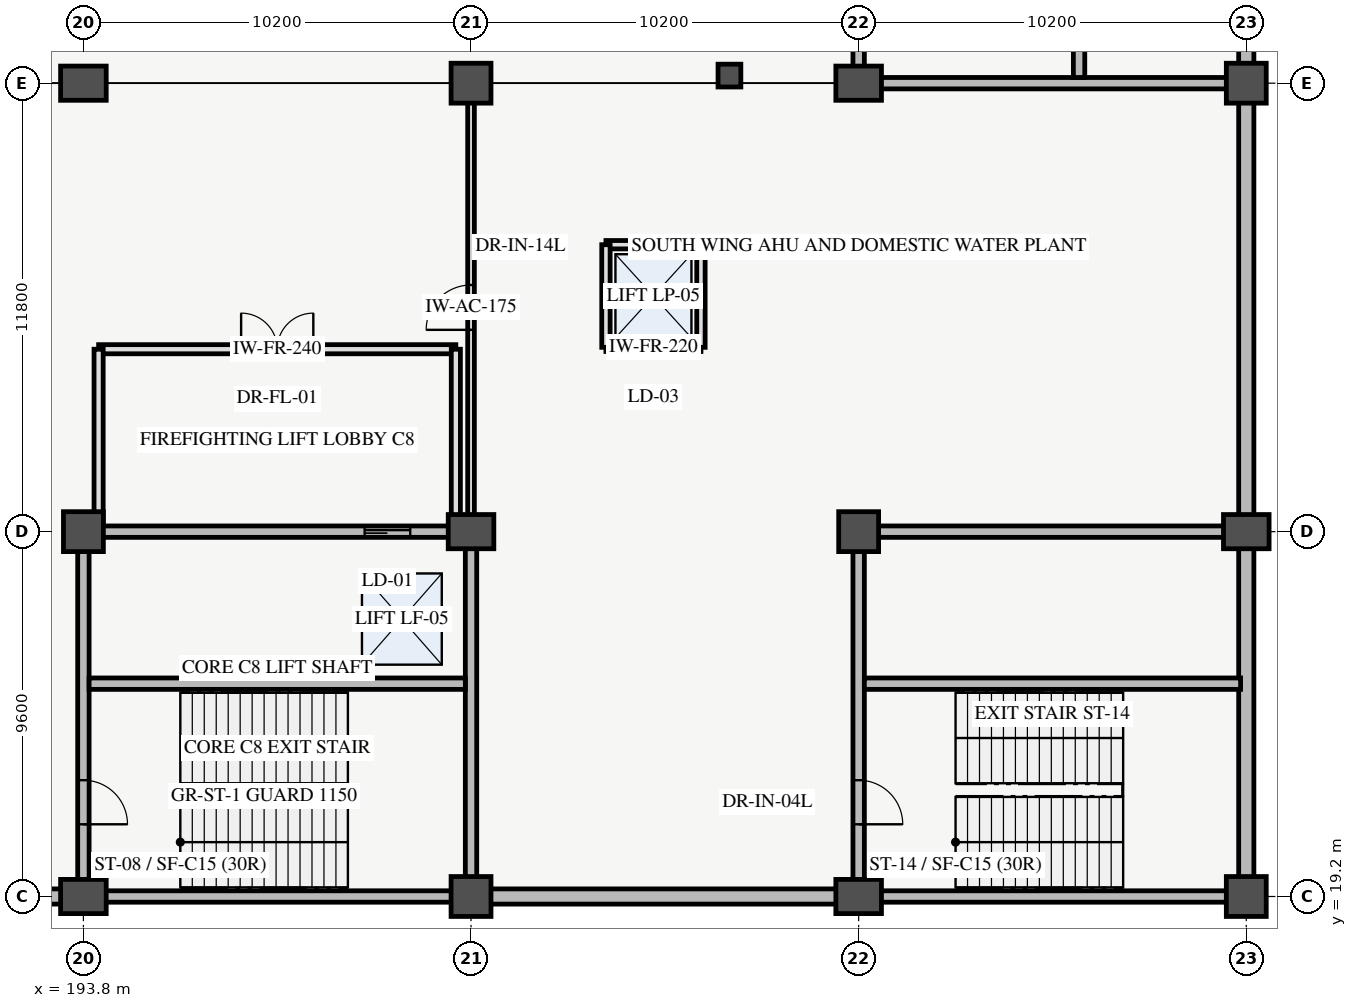
"""IFC4 building model, lengths in metres.
Left out: names, types, materials, properties, quantities, classifications, styles, units other than length and angle.
Written with IfcOpenShell. Run it as: python <this file> out.ifc"""

import sys

from ifc_helpers import new_model, si_unit, direction, frame, frame_2d, origin, origin_2d, place, context, subcontext, project, spatial, rectangle, extrude, element, fill, save


model = new_model("IFC4")
c1 = context("Model", 3, precision=1e-05, world=origin(), true_north=direction((0.0, 1.0)))
c2 = subcontext(c1, "Body", "Model", "MODEL_VIEW")
j1 = project(units=[si_unit("LENGTHUNIT", "METRE"), si_unit("PLANEANGLEUNIT", "RADIAN")], contexts=[c1])
p1 = place(None, origin())
s1 = spatial("IfcSite", under=j1, at=p1, CompositionType="ELEMENT")
p2 = place(p1, origin())
s2 = spatial("IfcBuilding", under=s1, at=p2, CompositionType="ELEMENT")
p3 = place(p2, frame((0.0, 0.0, -4.5)))
s3 = spatial("IfcBuildingStorey", under=s2, at=p3, CompositionType="ELEMENT", Elevation=-4.5)
p4 = place(p3, frame((193.8, 19.2, 0.0), z_axis=(0.0, 0.0, 1.0), x_axis=(1.0, 0.0, 0.0)))
e1 = element("IfcColumn", 1, at=p4, inside=s3, PredefinedType="COLUMN", context=c2, shape_type="SweptSolid", body=[
    extrude(rectangle(XDim=1.2, YDim=0.9, at=origin_2d()), origin(), (0.0, 0.0, 1.0), 4.5),
])
p5 = place(p3, frame((193.8, 28.8, 0.0), z_axis=(0.0, 0.0, 1.0), x_axis=(1.0, 0.0, 0.0)))
e2 = element("IfcColumn", 2, at=p5, inside=s3, PredefinedType="COLUMN", context=c2, shape_type="SweptSolid", body=[
    extrude(rectangle(XDim=1.05, YDim=1.05, at=origin_2d()), origin(), (0.0, 0.0, 1.0), 4.5),
])
p6 = place(p3, frame((193.8, 40.6, 0.0), z_axis=(0.0, 0.0, 1.0), x_axis=(1.0, 0.0, 0.0)))
e3 = element("IfcColumn", 3, at=p6, inside=s3, PredefinedType="COLUMN", context=c2, shape_type="SweptSolid", body=[
    extrude(rectangle(XDim=1.2, YDim=0.9, at=origin_2d()), origin(), (0.0, 0.0, 1.0), 4.5),
])
p7 = place(p3, frame((204.0, 19.2, 0.0), z_axis=(0.0, 0.0, 1.0), x_axis=(1.0, 0.0, 0.0)))
e4 = element("IfcColumn", 4, at=p7, inside=s3, PredefinedType="COLUMN", context=c2, shape_type="SweptSolid", body=[
    extrude(rectangle(XDim=1.05, YDim=1.05, at=origin_2d()), origin(), (0.0, 0.0, 1.0), 4.5),
])
p8 = place(p3, frame((204.0, 28.8, 0.0), z_axis=(0.0, 0.0, 1.0), x_axis=(1.0, 0.0, 0.0)))
e5 = element("IfcColumn", 5, at=p8, inside=s3, PredefinedType="COLUMN", context=c2, shape_type="SweptSolid", body=[
    extrude(rectangle(XDim=1.2, YDim=0.9, at=origin_2d()), origin(), (0.0, 0.0, 1.0), 4.5),
])
p9 = place(p3, frame((204.0, 40.6, 0.0), z_axis=(0.0, 0.0, 1.0), x_axis=(1.0, 0.0, 0.0)))
e6 = element("IfcColumn", 6, at=p9, inside=s3, PredefinedType="COLUMN", context=c2, shape_type="SweptSolid", body=[
    extrude(rectangle(XDim=1.05, YDim=1.05, at=origin_2d()), origin(), (0.0, 0.0, 1.0), 4.5),
])
p10 = place(p3, frame((214.2, 19.2, 0.0), z_axis=(0.0, 0.0, 1.0), x_axis=(1.0, 0.0, 0.0)))
e7 = element("IfcColumn", 7, at=p10, inside=s3, PredefinedType="COLUMN", context=c2, shape_type="SweptSolid", body=[
    extrude(rectangle(XDim=1.2, YDim=0.9, at=origin_2d()), origin(), (0.0, 0.0, 1.0), 4.5),
])
p11 = place(p3, frame((214.2, 28.8, 0.0), z_axis=(0.0, 0.0, 1.0), x_axis=(1.0, 0.0, 0.0)))
e8 = element("IfcColumn", 8, at=p11, inside=s3, PredefinedType="COLUMN", context=c2, shape_type="SweptSolid", body=[
    extrude(rectangle(XDim=1.05, YDim=1.05, at=origin_2d()), origin(), (0.0, 0.0, 1.0), 4.5),
])
p12 = place(p3, frame((214.2, 40.6, 0.0), z_axis=(0.0, 0.0, 1.0), x_axis=(1.0, 0.0, 0.0)))
e9 = element("IfcColumn", 9, at=p12, inside=s3, PredefinedType="COLUMN", context=c2, shape_type="SweptSolid", body=[
    extrude(rectangle(XDim=1.2, YDim=0.9, at=origin_2d()), origin(), (0.0, 0.0, 1.0), 4.5),
])
p13 = place(p3, frame((224.4, 19.2, 0.0), z_axis=(0.0, 0.0, 1.0), x_axis=(1.0, 0.0, 0.0)))
e10 = element("IfcColumn", 10, at=p13, inside=s3, PredefinedType="COLUMN", context=c2, shape_type="SweptSolid", body=[
    extrude(rectangle(XDim=1.05, YDim=1.05, at=origin_2d()), origin(), (0.0, 0.0, 1.0), 4.5),
])
p14 = place(p3, frame((224.4, 28.8, 0.0), z_axis=(0.0, 0.0, 1.0), x_axis=(1.0, 0.0, 0.0)))
e11 = element("IfcColumn", 11, at=p14, inside=s3, PredefinedType="COLUMN", context=c2, shape_type="SweptSolid", body=[
    extrude(rectangle(XDim=1.2, YDim=0.9, at=origin_2d()), origin(), (0.0, 0.0, 1.0), 4.5),
])
p15 = place(p3, frame((224.4, 40.6, 0.0), z_axis=(0.0, 0.0, 1.0), x_axis=(1.0, 0.0, 0.0)))
e12 = element("IfcColumn", 12, at=p15, inside=s3, PredefinedType="COLUMN", context=c2, shape_type="SweptSolid", body=[
    extrude(rectangle(XDim=1.05, YDim=1.05, at=origin_2d()), origin(), (0.0, 0.0, 1.0), 4.5),
])
p16 = place(p3, frame((193.8, 19.2, 0.0), z_axis=(0.0, 0.0, 1.0), x_axis=(1.0, 0.0, 0.0)))
e13 = element("IfcWall", 13, at=p16, inside=s3, PredefinedType="SHEAR", context=c2, shape_type="SweptSolid", body=[
    extrude(rectangle(XDim=10.2, YDim=0.3, at=frame_2d((5.1, 0.0))), origin(), (0.0, 0.0, 1.0), 4.5),
])
p17 = place(p3, frame((193.8, 28.8, 0.0), z_axis=(0.0, 0.0, 1.0), x_axis=(1.0, 0.0, 0.0)))
e14 = element("IfcWall", 14, at=p17, inside=s3, PredefinedType="SHEAR", context=c2, shape_type="SweptSolid", body=[
    extrude(rectangle(XDim=10.2, YDim=0.3, at=frame_2d((5.1, 0.0))), origin(), (0.0, 0.0, 1.0), 4.5),
])
p18 = place(p17, frame((7.4, 0.0, 0.0)))
e15 = element("IfcOpeningElement", 15, at=p18, cuts=e14, PredefinedType="OPENING", context=c2, shape_type="SweptSolid", body=[
    extrude(rectangle(XDim=1.2, YDim=2.25, at=frame_2d((0.6, 1.125))), frame((0.0, 0.16, 0.0), z_axis=(0.0, -1.0, 0.0), x_axis=(1.0, 0.0, 0.0)), (0.0, 0.0, 1.0), 0.32),
])
p19 = place(p3, frame((193.8, 19.2, 0.0), z_axis=(0.0, 0.0, 1.0), x_axis=(0.0, 1.0, 0.0)))
e16 = element("IfcWall", 16, at=p19, inside=s3, PredefinedType="SHEAR", context=c2, shape_type="SweptSolid", body=[
    extrude(rectangle(XDim=9.6, YDim=0.3, at=frame_2d((4.8, 0.0))), origin(), (0.0, 0.0, 1.0), 4.5),
])
p20 = place(p19, frame((1.9, 0.0, 0.0)))
e17 = element("IfcOpeningElement", 17, at=p20, cuts=e16, PredefinedType="OPENING", context=c2, shape_type="SweptSolid", body=[
    extrude(rectangle(XDim=1.16, YDim=2.2, at=frame_2d((0.58, 1.1))), frame((0.0, 0.16, 0.0), z_axis=(0.0, -1.0, 0.0), x_axis=(1.0, 0.0, 0.0)), (0.0, 0.0, 1.0), 0.32),
])
p21 = place(p3, frame((204.0, 19.2, 0.0), z_axis=(0.0, 0.0, 1.0), x_axis=(0.0, 1.0, 0.0)))
e18 = element("IfcWall", 18, at=p21, inside=s3, PredefinedType="SHEAR", context=c2, shape_type="SweptSolid", body=[
    extrude(rectangle(XDim=9.6, YDim=0.3, at=frame_2d((4.8, 0.0))), origin(), (0.0, 0.0, 1.0), 4.5),
])
p22 = place(p3, frame((173.4, 19.2, 0.0), z_axis=(0.0, 0.0, 1.0), x_axis=(1.0, 0.0, 0.0)))
e19 = element("IfcWall", 19, at=p22, inside=s3, PredefinedType="SOLIDWALL", context=c2, shape_type="SweptSolid", body=[
    extrude(rectangle(XDim=20.2, YDim=0.4, at=frame_2d((10.1, 0.0))), origin(), (0.0, 0.0, 1.0), 4.1),
])
p23 = place(p3, frame((204.2, 19.2, 0.0), z_axis=(0.0, 0.0, 1.0), x_axis=(1.0, 0.0, 0.0)))
e20 = element("IfcWall", 20, at=p23, inside=s3, PredefinedType="SOLIDWALL", context=c2, shape_type="SweptSolid", body=[
    extrude(rectangle(XDim=9.8, YDim=0.4, at=frame_2d((4.9, 0.0))), origin(), (0.0, 0.0, 1.0), 4.1),
])
p24 = place(p3, frame((224.4, 19.2, 0.0), z_axis=(0.0, 0.0, 1.0), x_axis=(0.0, 1.0, 0.0)))
e21 = element("IfcWall", 21, at=p24, inside=s3, PredefinedType="SOLIDWALL", context=c2, shape_type="SweptSolid", body=[
    extrude(rectangle(XDim=68.6, YDim=0.4, at=frame_2d((34.3, 0.0))), origin(), (0.0, 0.0, 1.0), 4.1),
])
p25 = place(p3, frame((210.8, 40.8, 0.0), z_axis=(0.0, 0.0, 1.0), x_axis=(1.0, 0.0, 0.0)))
e22 = element("IfcColumn", 22, at=p25, inside=s3, PredefinedType="COLUMN", context=c2, shape_type="SweptSolid", body=[
    extrude(rectangle(XDim=0.6, YDim=0.6, at=origin_2d()), origin(), (0.0, 0.0, 1.0), 4.1),
])
p26 = place(p3, frame((193.95, 24.8, 0.0), z_axis=(0.0, 0.0, 1.0), x_axis=(1.0, 0.0, 0.0)))
e23 = element("IfcWall", 23, at=p26, inside=s3, PredefinedType="SHEAR", context=c2, shape_type="SweptSolid", body=[
    extrude(rectangle(XDim=9.9, YDim=0.3, at=frame_2d((4.95, 0.0))), origin(), (0.0, 0.0, 1.0), 4.5),
])
for number, where, z_axis, x_axis in (
    (24, (214.2, 19.2, 0.0), (0.0, 0.0, 1.0), (1.0, 0.0, 0.0)),
    (25, (214.2, 28.8, 0.0), (0.0, 0.0, 1.0), (1.0, 0.0, 0.0)),
):
    element("IfcWall", number, at=place(p3, frame(where, z_axis=z_axis, x_axis=x_axis)), inside=s3, PredefinedType="SHEAR", context=c2, shape_type="SweptSolid", body=[
        extrude(rectangle(XDim=10.2, YDim=0.3, at=frame_2d((5.1, 0.0))), origin(), (0.0, 0.0, 1.0), 4.5),
    ])
p27 = place(p3, frame((214.2, 19.2, 0.0), z_axis=(0.0, 0.0, 1.0), x_axis=(0.0, 1.0, 0.0)))
e26 = element("IfcWall", 26, at=p27, inside=s3, PredefinedType="SHEAR", context=c2, shape_type="SweptSolid", body=[
    extrude(rectangle(XDim=9.6, YDim=0.3, at=frame_2d((4.8, 0.0))), origin(), (0.0, 0.0, 1.0), 4.5),
])
p28 = place(p27, frame((1.9, 0.0, 0.0)))
e27 = element("IfcOpeningElement", 27, at=p28, cuts=e26, PredefinedType="OPENING", context=c2, shape_type="SweptSolid", body=[
    extrude(rectangle(XDim=1.16, YDim=2.2, at=frame_2d((0.58, 1.1))), frame((0.0, 0.16, 0.0), z_axis=(0.0, -1.0, 0.0), x_axis=(1.0, 0.0, 0.0)), (0.0, 0.0, 1.0), 0.32),
])
p29 = place(p3, frame((214.35, 24.8, 0.0), z_axis=(0.0, 0.0, 1.0), x_axis=(1.0, 0.0, 0.0)))
e28 = element("IfcWall", 28, at=p29, inside=s3, PredefinedType="SHEAR", context=c2, shape_type="SweptSolid", body=[
    extrude(rectangle(XDim=9.9, YDim=0.3, at=frame_2d((4.95, 0.0))), origin(), (0.0, 0.0, 1.0), 4.5),
])
p30 = place(p3, frame((214.2, 40.6, 0.0), z_axis=(0.0, 0.0, 1.0), x_axis=(1.0, 0.0, 0.0)))
e29 = element("IfcWall", 29, at=p30, inside=s3, PredefinedType="SHEAR", context=c2, shape_type="SweptSolid", body=[
    extrude(rectangle(XDim=10.2, YDim=0.3, at=frame_2d((5.1, 0.0))), origin(), (0.0, 0.0, 1.0), 4.5),
])
p31 = place(p3, frame((214.2, 40.6, 0.0), z_axis=(0.0, 0.0, 1.0), x_axis=(0.0, 1.0, 0.0)))
e30 = element("IfcWall", 30, at=p31, inside=s3, PredefinedType="SHEAR", context=c2, shape_type="SweptSolid", body=[
    extrude(rectangle(XDim=11.8, YDim=0.3, at=frame_2d((5.9, 0.0))), origin(), (0.0, 0.0, 1.0), 4.5),
])
p32 = place(p3, frame((220.0, 40.75, 0.0), z_axis=(0.0, 0.0, 1.0), x_axis=(0.0, 1.0, 0.0)))
e31 = element("IfcWall", 31, at=p32, inside=s3, PredefinedType="SHEAR", context=c2, shape_type="SweptSolid", body=[
    extrude(rectangle(XDim=11.5, YDim=0.3, at=frame_2d((5.75, 0.0))), origin(), (0.0, 0.0, 1.0), 4.5),
])
p33 = place(p3, frame((207.55, 33.65, 0.0), z_axis=(0.0, 0.0, 1.0), x_axis=(1.0, 0.0, 0.0)))
e32 = element("IfcWall", 32, at=p33, inside=s3, PredefinedType="PARTITIONING", context=c2, shape_type="SweptSolid", body=[
    extrude(rectangle(XDim=2.5, YDim=0.22, at=frame_2d((1.25, 0.0))), origin(), (0.0, 0.0, 1.0), 4.1),
])
p34 = place(p33, frame((0.575, 0.0, 0.0)))
e33 = element("IfcOpeningElement", 33, at=p34, cuts=e32, PredefinedType="OPENING", context=c2, shape_type="SweptSolid", body=[
    extrude(rectangle(XDim=1.35, YDim=2.3, at=frame_2d((0.675, 1.15))), frame((0.0, 0.12, 0.0), z_axis=(0.0, -1.0, 0.0), x_axis=(1.0, 0.0, 0.0)), (0.0, 0.0, 1.0), 0.24),
])
p35 = place(p3, frame((207.55, 36.35, 0.0), z_axis=(0.0, 0.0, 1.0), x_axis=(1.0, 0.0, 0.0)))
e34 = element("IfcWall", 34, at=p35, inside=s3, PredefinedType="PARTITIONING", context=c2, shape_type="SweptSolid", body=[
    extrude(rectangle(XDim=2.5, YDim=0.22, at=frame_2d((1.25, 0.0))), origin(), (0.0, 0.0, 1.0), 4.1),
])
for number, where, z_axis, x_axis in (
    (35, (207.55, 33.65, 0.0), (0.0, 0.0, 1.0), (0.0, 1.0, 0.0)),
    (36, (210.05, 33.65, 0.0), (0.0, 0.0, 1.0), (0.0, 1.0, 0.0)),
):
    element("IfcWall", number, at=place(p3, frame(where, z_axis=z_axis, x_axis=x_axis)), inside=s3, PredefinedType="PARTITIONING", context=c2, shape_type="SweptSolid", body=[
        extrude(rectangle(XDim=2.7, YDim=0.22, at=frame_2d((1.35, 0.0))), origin(), (0.0, 0.0, 1.0), 4.1),
    ])
p36 = place(p3, frame((194.2, 33.6, 0.0), z_axis=(0.0, 0.0, 1.0), x_axis=(1.0, 0.0, 0.0)))
e37 = element("IfcWall", 37, at=p36, inside=s3, PredefinedType="PARTITIONING", context=c2, shape_type="SweptSolid", body=[
    extrude(rectangle(XDim=9.4, YDim=0.24, at=frame_2d((4.7, 0.0))), origin(), (0.0, 0.0, 1.0), 2.75),
])
p37 = place(p36, frame((3.75, 0.0, 0.0)))
e38 = element("IfcOpeningElement", 38, at=p37, cuts=e37, PredefinedType="OPENING", context=c2, shape_type="SweptSolid", body=[
    extrude(rectangle(XDim=1.9, YDim=2.25, at=frame_2d((0.95, 1.125))), frame((0.0, 0.13, 0.0), z_axis=(0.0, -1.0, 0.0), x_axis=(1.0, 0.0, 0.0)), (0.0, 0.0, 1.0), 0.26),
])
for number, where, z_axis, x_axis in (
    (39, (203.6, 29.0, 0.0), (0.0, 0.0, 1.0), (0.0, 1.0, 0.0)),
    (40, (194.2, 29.0, 0.0), (0.0, 0.0, 1.0), (0.0, 1.0, 0.0)),
):
    element("IfcWall", number, at=place(p3, frame(where, z_axis=z_axis, x_axis=x_axis)), inside=s3, PredefinedType="PARTITIONING", context=c2, shape_type="SweptSolid", body=[
        extrude(rectangle(XDim=4.6, YDim=0.24, at=frame_2d((2.3, 0.0))), origin(), (0.0, 0.0, 1.0), 2.75),
    ])
p38 = place(p3, frame((204.0, 29.2, 0.0), z_axis=(0.0, 0.0, 1.0), x_axis=(0.0, 1.0, 0.0)))
e41 = element("IfcWall", 41, at=p38, inside=s3, PredefinedType="PARTITIONING", context=c2, shape_type="SweptSolid", body=[
    extrude(rectangle(XDim=11.0, YDim=0.175, at=frame_2d((5.5, 0.0))), origin(), (0.0, 0.0, 1.0), 2.75),
])
p39 = place(p38, frame((4.91, 0.0, 0.0)))
e42 = element("IfcOpeningElement", 42, at=p39, cuts=e41, PredefinedType="OPENING", context=c2, shape_type="SweptSolid", body=[
    extrude(rectangle(XDim=1.18, YDim=2.22, at=frame_2d((0.59, 1.11))), frame((0.0, 0.097, 0.0), z_axis=(0.0, -1.0, 0.0), x_axis=(1.0, 0.0, 0.0)), (0.0, 0.0, 1.0), 0.195),
])
p40 = place(p20, origin())
e43 = element("IfcDoor", 43, at=p40, inside=s3, OperationType="SINGLE_SWING_LEFT", PredefinedType="DOOR", context=c2, shape_type="SweptSolid", body=[
    extrude(rectangle(XDim=1.16, YDim=2.2, at=frame_2d((0.58, 1.1))), frame((0.0, 0.025, 0.0), z_axis=(0.0, -1.0, 0.0), x_axis=(1.0, 0.0, 0.0)), (0.0, 0.0, 1.0), 0.05),
])
fill(e17, e43)
p41 = place(p18, origin())
e44 = element("IfcDoor", 44, at=p41, inside=s3, OperationType="SLIDING_TO_LEFT", PredefinedType="DOOR", context=c2, shape_type="SweptSolid", body=[
    extrude(rectangle(XDim=1.2, YDim=2.25, at=frame_2d((0.6, 1.125))), frame((0.0, 0.025, 0.0), z_axis=(0.0, -1.0, 0.0), x_axis=(1.0, 0.0, 0.0)), (0.0, 0.0, 1.0), 0.05),
])
fill(e15, e44)
p42 = place(p28, origin())
e45 = element("IfcDoor", 45, at=p42, inside=s3, OperationType="SINGLE_SWING_LEFT", PredefinedType="DOOR", context=c2, shape_type="SweptSolid", body=[
    extrude(rectangle(XDim=1.16, YDim=2.2, at=frame_2d((0.58, 1.1))), frame((0.0, 0.025, 0.0), z_axis=(0.0, -1.0, 0.0), x_axis=(1.0, 0.0, 0.0)), (0.0, 0.0, 1.0), 0.05),
])
fill(e27, e45)
p43 = place(p34, origin())
e46 = element("IfcDoor", 46, at=p43, inside=s3, OperationType="DOUBLE_DOOR_SLIDING", PredefinedType="DOOR", context=c2, shape_type="SweptSolid", body=[
    extrude(rectangle(XDim=1.35, YDim=2.3, at=frame_2d((0.675, 1.15))), frame((0.0, 0.025, 0.0), z_axis=(0.0, -1.0, 0.0), x_axis=(1.0, 0.0, 0.0)), (0.0, 0.0, 1.0), 0.05),
])
fill(e33, e46)
p44 = place(p37, origin())
e47 = element("IfcDoor", 47, at=p44, inside=s3, OperationType="DOUBLE_DOOR_SINGLE_SWING", PredefinedType="DOOR", context=c2, shape_type="SweptSolid", body=[
    extrude(rectangle(XDim=1.9, YDim=2.25, at=frame_2d((0.95, 1.125))), frame((0.0, 0.025, 0.0), z_axis=(0.0, -1.0, 0.0), x_axis=(1.0, 0.0, 0.0)), (0.0, 0.0, 1.0), 0.05),
])
fill(e38, e47)
p45 = place(p39, origin())
e48 = element("IfcDoor", 48, at=p45, inside=s3, OperationType="SINGLE_SWING_LEFT", PredefinedType="DOOR", context=c2, shape_type="SweptSolid", body=[
    extrude(rectangle(XDim=1.18, YDim=2.22, at=frame_2d((0.59, 1.11))), frame((0.0, 0.025, 0.0), z_axis=(0.0, -1.0, 0.0), x_axis=(1.0, 0.0, 0.0)), (0.0, 0.0, 1.0), 0.05),
])
fill(e42, e48)
save(model, sys.argv[1])
